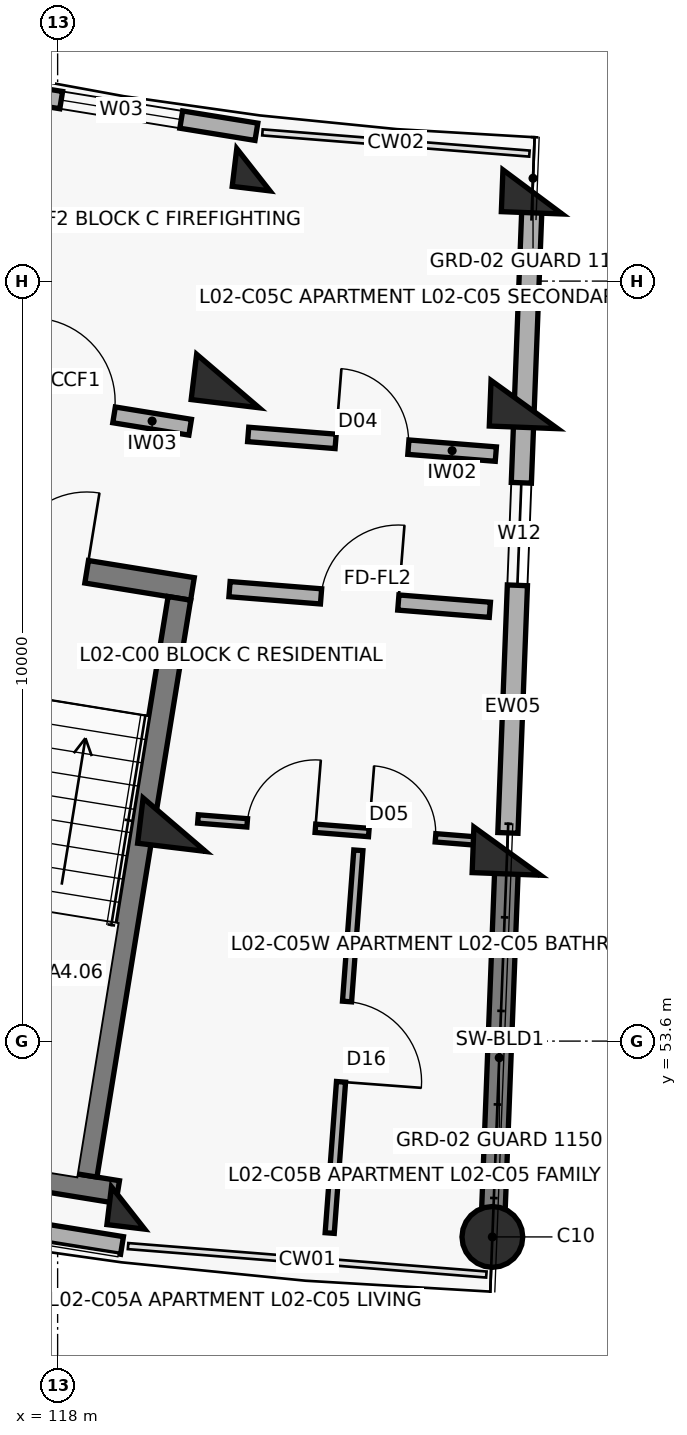
"""IFC4 building model, lengths in metres.
Left out: names, types, materials, properties, quantities, classifications, styles, units other than length and angle.
Written with IfcOpenShell. Run it as: python <this file> out.ifc"""

import sys

from ifc_helpers import new_model, si_unit, direction, frame, frame_2d, origin, origin_2d, place, context, subcontext, project, spatial, rectangle, circle, extrude, element, fill, save


model = new_model("IFC4")
c1 = context("Model", 3, precision=1e-05, world=origin(), true_north=direction((0.0, 1.0)))
c2 = subcontext(c1, "Body", "Model", "MODEL_VIEW")
j1 = project(units=[si_unit("LENGTHUNIT", "METRE"), si_unit("PLANEANGLEUNIT", "RADIAN")], contexts=[c1])
p1 = place(None, origin())
s1 = spatial("IfcSite", under=j1, at=p1, CompositionType="ELEMENT")
p2 = place(p1, origin())
s2 = spatial("IfcBuilding", under=s1, at=p2, CompositionType="ELEMENT")
p3 = place(p2, frame((0.0, 0.0, 8.1)))
s3 = spatial("IfcBuildingStorey", under=s2, at=p3, CompositionType="ELEMENT", Elevation=8.1)
p4 = place(p3, frame((120.575, 65.065, 0.0), z_axis=(0.0, 0.0, 1.0), x_axis=(-0.119790293837, -0.992799217114, 0.0)))
e1 = element("IfcColumn", 1, at=p4, inside=s3, PredefinedType="COLUMN", context=c2, shape_type="SweptSolid", body=[
    extrude(rectangle(XDim=0.5, YDim=0.5, at=origin_2d()), origin(), (0.0, 0.0, 1.0), 3.1),
])
for number, where, z_axis, x_axis in (
    (2, (120.24, 62.285, 0.0), (0.0, 0.0, 1.0), (-0.12, -0.993, 0.0)),
    (3, (119.535, 56.448, 0.0), (0.0, 0.0, 1.0), (-0.12, -0.993, 0.0)),
):
    element("IfcColumn", number, at=place(p3, frame(where, z_axis=z_axis, x_axis=x_axis)), inside=s3, PredefinedType="COLUMN", context=c2, shape_type="SweptSolid", body=[
        extrude(rectangle(XDim=0.6, YDim=0.9, at=origin_2d()), origin(), (0.0, 0.0, 1.0), 3.1),
    ])
p5 = place(p3, frame((118.927, 51.404, 0.0), z_axis=(0.0, 0.0, 1.0), x_axis=(-0.119790293837, -0.992799217114, 0.0)))
e4 = element("IfcColumn", 4, at=p5, inside=s3, PredefinedType="COLUMN", context=c2, shape_type="SweptSolid", body=[
    extrude(rectangle(XDim=0.5, YDim=0.5, at=origin_2d()), origin(), (0.0, 0.0, 1.0), 3.1),
])
p6 = place(p3, frame((124.248, 64.773, 0.0), z_axis=(0.0, 0.0, 1.0), x_axis=(-0.038387809088, -0.999262916411, 0.0)))
e5 = element("IfcColumn", 5, at=p6, inside=s3, PredefinedType="COLUMN", context=c2, shape_type="SweptSolid", body=[
    extrude(rectangle(XDim=0.55, YDim=0.8, at=origin_2d()), origin(), (0.0, 0.0, 1.0), 3.1),
])
for number, where, z_axis, x_axis in (
    (6, (124.14, 61.975, 0.0), (0.0, 0.0, 1.0), (-0.038, -0.999, 0.0)),
    (7, (123.915, 56.1, 0.0), (0.0, 0.0, 1.0), (-0.038, -0.999, 0.0)),
):
    element("IfcColumn", number, at=place(p3, frame(where, z_axis=z_axis, x_axis=x_axis)), inside=s3, PredefinedType="COLUMN", context=c2, shape_type="SweptSolid", body=[
        extrude(rectangle(XDim=0.6, YDim=0.9, at=origin_2d()), origin(), (0.0, 0.0, 1.0), 3.1),
    ])
p7 = place(p3, frame((123.72, 51.023, 0.0), z_axis=(0.0, 0.0, 1.0), x_axis=(-0.038387809088, -0.999262916411, 0.0)))
e8 = element("IfcColumn", 8, at=p7, inside=s3, PredefinedType="COLUMN", context=c2, shape_type="SweptSolid", body=[
    extrude(circle(Radius=0.4, at=origin_2d()), origin(), (0.0, 0.0, 1.0), 3.1),
])
p8 = place(p3, frame((123.908, 55.92, 0.0), z_axis=(0.0, 0.0, 1.0), x_axis=(-0.038381471406, -0.99926315986, 0.0)))
e9 = element("IfcWall", 9, at=p8, inside=s3, PredefinedType="SHEAR", context=c2, shape_type="SweptSolid", body=[
    extrude(rectangle(XDim=4.72, YDim=0.31, at=frame_2d((2.36, 0.0))), origin(), (0.0, 0.0, 1.0), 2.86),
])
p9 = place(p3, frame((114.1, 51.681, 0.0), z_axis=(0.0, 0.0, 1.0), x_axis=(0.987080750493, -0.160223568819, 0.0)))
e10 = element("IfcWall", 10, at=p9, inside=s3, PredefinedType="SOLIDWALL", context=c2, shape_type="SweptSolid", body=[
    extrude(rectangle(XDim=4.809, YDim=0.235, at=frame_2d((2.404, 0.0))), origin(), (0.0, 0.0, 1.0), 2.25),
])
p10 = place(p3, frame((117.058, 66.142, 0.0), z_axis=(0.0, 0.0, 1.0), x_axis=(0.987080874485, -0.160222804952, 0.0)))
e11 = element("IfcWall", 11, at=p10, inside=s3, PredefinedType="SOLIDWALL", context=c2, shape_type="SweptSolid", body=[
    extrude(rectangle(XDim=3.604, YDim=0.23, at=frame_2d((1.802, 0.0))), origin(), (0.0, 0.0, 1.0), 2.25),
])
p11 = place(p10, frame((1.002, 0.0, 0.32)))
e12 = element("IfcOpeningElement", 12, at=p11, cuts=e11, PredefinedType="OPENING", context=c2, shape_type="SweptSolid", body=[
    extrude(rectangle(XDim=1.6, YDim=1.5, at=frame_2d((0.8, 0.75))), frame((0.0, 0.125, 0.0), z_axis=(0.0, -1.0, 0.0), x_axis=(1.0, 0.0, 0.0)), (0.0, 0.0, 1.0), 0.25),
])
p12 = place(p3, frame((124.239, 64.533, 0.0), z_axis=(0.0, 0.0, 1.0), x_axis=(-0.038407966241, -0.999262141847, 0.0)))
e13 = element("IfcWall", 13, at=p12, inside=s3, PredefinedType="SOLIDWALL", context=c2, shape_type="SweptSolid", body=[
    extrude(rectangle(XDim=8.2, YDim=0.265, at=frame_2d((4.1, 0.0))), origin(), (0.0, 0.0, 1.0), 2.08),
])
p13 = place(p12, frame((3.59, 0.0, 0.75)))
e14 = element("IfcOpeningElement", 14, at=p13, cuts=e13, PredefinedType="OPENING", context=c2, shape_type="SweptSolid", body=[
    extrude(rectangle(XDim=1.35, YDim=1.35, at=frame_2d((0.675, 0.675))), frame((0.0, 0.142, 0.0), z_axis=(0.0, -1.0, 0.0), x_axis=(1.0, 0.0, 0.0)), (0.0, 0.0, 1.0), 0.285),
])
p14 = place(p3, frame((115.954, 60.169, 0.0), z_axis=(0.0, 0.0, 1.0), x_axis=(0.987077443397, -0.160243941341, 0.0)))
e15 = element("IfcWall", 15, at=p14, inside=s3, PredefinedType="SHEAR", context=c2, shape_type="SweptSolid", body=[
    extrude(rectangle(XDim=3.87, YDim=0.3, at=frame_2d((1.935, 0.0))), origin(), (0.0, 0.0, 1.0), 3.1),
])
p15 = place(p14, frame((1.41, 0.0, 0.0)))
e16 = element("IfcOpeningElement", 16, at=p15, cuts=e15, PredefinedType="OPENING", context=c2, shape_type="SweptSolid", body=[
    extrude(rectangle(XDim=1.05, YDim=2.15, at=frame_2d((0.525, 1.075))), frame((0.0, 0.16, 0.0), z_axis=(0.0, -1.0, 0.0), x_axis=(1.0, 0.0, 0.0)), (0.0, 0.0, 1.0), 0.32),
])
p16 = place(p3, frame((114.377, 52.331, 0.0), z_axis=(0.0, 0.0, 1.0), x_axis=(0.987077474317, -0.16024375088, 0.0)))
e17 = element("IfcWall", 17, at=p16, inside=s3, PredefinedType="SHEAR", context=c2, shape_type="SweptSolid", body=[
    extrude(rectangle(XDim=4.47, YDim=0.3, at=frame_2d((2.235, 0.0))), origin(), (0.0, 0.0, 1.0), 3.1),
])
p17 = place(p3, frame((119.602, 59.425, 0.0), z_axis=(0.0, 0.0, 1.0), x_axis=(-0.160201584773, -0.987084318706, 0.0)))
e18 = element("IfcWall", 18, at=p17, inside=s3, PredefinedType="SHEAR", context=c2, shape_type="SweptSolid", body=[
    extrude(rectangle(XDim=7.69, YDim=0.3, at=frame_2d((3.845, 0.0))), origin(), (0.0, 0.0, 1.0), 3.1),
])
p18 = place(p3, frame((116.656, 62.178, 0.0), z_axis=(0.0, 0.0, 1.0), x_axis=(0.987083140276, -0.16020884552, 0.0)))
e19 = element("IfcWall", 19, at=p18, inside=s3, PredefinedType="SOLIDWALL", context=c2, shape_type="SweptSolid", body=[
    extrude(rectangle(XDim=3.129, YDim=0.21, at=frame_2d((1.564, 0.0))), origin(), (0.0, 0.0, 1.0), 2.08),
])
p19 = place(p18, frame((1.014, 0.0, 0.0)))
e20 = element("IfcOpeningElement", 20, at=p19, cuts=e19, PredefinedType="OPENING", context=c2, shape_type="SweptSolid", body=[
    extrude(rectangle(XDim=1.1, YDim=2.15, at=frame_2d((0.55, 1.075))), frame((0.0, 0.115, 0.0), z_axis=(0.0, -1.0, 0.0), x_axis=(1.0, 0.0, 0.0)), (0.0, 0.0, 1.0), 0.23),
])
p20 = place(p3, frame((120.261, 59.547, 0.0), z_axis=(0.0, 0.0, 1.0), x_axis=(0.996862545573, -0.079152165058, 0.0)))
e21 = element("IfcWall", 21, at=p20, inside=s3, PredefinedType="SOLIDWALL", context=c2, shape_type="SweptSolid", body=[
    extrude(rectangle(XDim=3.436, YDim=0.2, at=frame_2d((1.718, 0.0))), origin(), (0.0, 0.0, 1.0), 2.08),
])
p21 = place(p20, frame((1.208, 0.0, 0.0)))
e22 = element("IfcOpeningElement", 22, at=p21, cuts=e21, PredefinedType="OPENING", context=c2, shape_type="SweptSolid", body=[
    extrude(rectangle(XDim=1.02, YDim=2.15, at=frame_2d((0.51, 1.075))), frame((0.0, 0.11, 0.0), z_axis=(0.0, -1.0, 0.0), x_axis=(1.0, 0.0, 0.0)), (0.0, 0.0, 1.0), 0.22),
])
p22 = place(p3, frame((120.507, 61.582, 0.0), z_axis=(0.0, 0.0, 1.0), x_axis=(0.996860715473, -0.07917521043, 0.0)))
e23 = element("IfcWall", 23, at=p22, inside=s3, PredefinedType="SOLIDWALL", context=c2, shape_type="SweptSolid", body=[
    extrude(rectangle(XDim=3.269, YDim=0.19, at=frame_2d((1.634, 0.0))), origin(), (0.0, 0.0, 1.0), 2.08),
])
p23 = place(p22, frame((1.154, 0.0, 0.0)))
e24 = element("IfcOpeningElement", 24, at=p23, cuts=e23, PredefinedType="OPENING", context=c2, shape_type="SweptSolid", body=[
    extrude(rectangle(XDim=0.96, YDim=2.1, at=frame_2d((0.48, 1.05))), frame((0.0, 0.105, 0.0), z_axis=(0.0, -1.0, 0.0), x_axis=(1.0, 0.0, 0.0)), (0.0, 0.0, 1.0), 0.21),
])
p24 = place(p3, frame((119.846, 56.523, 0.0), z_axis=(0.0, 0.0, 1.0), x_axis=(0.996863292793, -0.079142753818, 0.0)))
e25 = element("IfcWall", 25, at=p24, inside=s3, PredefinedType="PARTITIONING", context=c2, shape_type="SweptSolid", body=[
    extrude(rectangle(XDim=3.785, YDim=0.11, at=frame_2d((1.893, 0.0))), origin(), (0.0, 0.0, 1.0), 2.08),
])
p25 = place(p24, frame((0.65, 0.0, 0.0)))
e26 = element("IfcOpeningElement", 26, at=p25, cuts=e25, PredefinedType="OPENING", context=c2, shape_type="SweptSolid", body=[
    extrude(rectangle(XDim=0.9, YDim=2.1, at=frame_2d((0.45, 1.05))), frame((0.0, 0.065, 0.0), z_axis=(0.0, -1.0, 0.0), x_axis=(1.0, 0.0, 0.0)), (0.0, 0.0, 1.0), 0.13),
])
p26 = place(p24, frame((2.255, 0.0, 0.0)))
e27 = element("IfcOpeningElement", 27, at=p26, cuts=e25, PredefinedType="OPENING", context=c2, shape_type="SweptSolid", body=[
    extrude(rectangle(XDim=0.88, YDim=2.1, at=frame_2d((0.44, 1.05))), frame((0.0, 0.065, 0.0), z_axis=(0.0, -1.0, 0.0), x_axis=(1.0, 0.0, 0.0)), (0.0, 0.0, 1.0), 0.13),
])
p27 = place(p3, frame((121.957, 56.11, 0.0), z_axis=(0.0, 0.0, 1.0), x_axis=(-0.074644522148, -0.997210206182, 0.0)))
e28 = element("IfcWall", 28, at=p27, inside=s3, PredefinedType="PARTITIONING", context=c2, shape_type="SweptSolid", body=[
    extrude(rectangle(XDim=5.05, YDim=0.12, at=frame_2d((2.525, 0.0))), origin(), (0.0, 0.0, 1.0), 2.08),
])
p28 = place(p27, frame((1.995, 0.0, 0.0)))
e29 = element("IfcOpeningElement", 29, at=p28, cuts=e28, PredefinedType="OPENING", context=c2, shape_type="SweptSolid", body=[
    extrude(rectangle(XDim=1.06, YDim=2.1, at=frame_2d((0.53, 1.05))), frame((0.0, 0.07, 0.0), z_axis=(0.0, -1.0, 0.0), x_axis=(1.0, 0.0, 0.0)), (0.0, 0.0, 1.0), 0.14),
])
p29 = place(p11, origin())
e30 = element("IfcWindow", 30, at=p29, inside=s3, PartitioningType="DOUBLE_PANEL_VERTICAL", PredefinedType="WINDOW", context=c2, shape_type="SweptSolid", body=[
    extrude(rectangle(XDim=1.6, YDim=1.5, at=frame_2d((0.8, 0.75))), frame((0.0, 0.03, 0.0), z_axis=(0.0, -1.0, 0.0), x_axis=(1.0, 0.0, 0.0)), (0.0, 0.0, 1.0), 0.06),
])
fill(e12, e30)
p30 = place(p13, origin())
e31 = element("IfcWindow", 31, at=p30, inside=s3, PartitioningType="DOUBLE_PANEL_VERTICAL", PredefinedType="WINDOW", context=c2, shape_type="SweptSolid", body=[
    extrude(rectangle(XDim=1.35, YDim=1.35, at=frame_2d((0.675, 0.675))), frame((0.0, 0.03, 0.0), z_axis=(0.0, -1.0, 0.0), x_axis=(1.0, 0.0, 0.0)), (0.0, 0.0, 1.0), 0.06),
])
fill(e14, e31)
p31 = place(p15, origin())
e32 = element("IfcDoor", 32, at=p31, inside=s3, OperationType="SINGLE_SWING_RIGHT", PredefinedType="DOOR", context=c2, shape_type="SweptSolid", body=[
    extrude(rectangle(XDim=1.05, YDim=2.15, at=frame_2d((0.525, 1.075))), frame((0.0, 0.025, 0.0), z_axis=(0.0, -1.0, 0.0), x_axis=(1.0, 0.0, 0.0)), (0.0, 0.0, 1.0), 0.05),
])
fill(e16, e32)
p32 = place(p19, origin())
e33 = element("IfcDoor", 33, at=p32, inside=s3, OperationType="SINGLE_SWING_LEFT", PredefinedType="DOOR", context=c2, shape_type="SweptSolid", body=[
    extrude(rectangle(XDim=1.1, YDim=2.15, at=frame_2d((0.55, 1.075))), frame((0.0, 0.025, 0.0), z_axis=(0.0, -1.0, 0.0), x_axis=(1.0, 0.0, 0.0)), (0.0, 0.0, 1.0), 0.05),
])
fill(e20, e33)
p33 = place(p21, origin())
e34 = element("IfcDoor", 34, at=p33, inside=s3, OperationType="SINGLE_SWING_RIGHT", PredefinedType="DOOR", context=c2, shape_type="SweptSolid", body=[
    extrude(rectangle(XDim=1.02, YDim=2.15, at=frame_2d((0.51, 1.075))), frame((0.0, 0.025, 0.0), z_axis=(0.0, -1.0, 0.0), x_axis=(1.0, 0.0, 0.0)), (0.0, 0.0, 1.0), 0.05),
])
fill(e22, e34)
p34 = place(p23, origin())
e35 = element("IfcDoor", 35, at=p34, inside=s3, OperationType="SINGLE_SWING_LEFT", PredefinedType="DOOR", context=c2, shape_type="SweptSolid", body=[
    extrude(rectangle(XDim=0.96, YDim=2.1, at=frame_2d((0.48, 1.05))), frame((0.0, 0.025, 0.0), z_axis=(0.0, -1.0, 0.0), x_axis=(1.0, 0.0, 0.0)), (0.0, 0.0, 1.0), 0.05),
])
fill(e24, e35)
p35 = place(p25, origin())
e36 = element("IfcDoor", 36, at=p35, inside=s3, OperationType="SINGLE_SWING_RIGHT", PredefinedType="DOOR", context=c2, shape_type="SweptSolid", body=[
    extrude(rectangle(XDim=0.9, YDim=2.1, at=frame_2d((0.45, 1.05))), frame((0.0, 0.025, 0.0), z_axis=(0.0, -1.0, 0.0), x_axis=(1.0, 0.0, 0.0)), (0.0, 0.0, 1.0), 0.05),
])
fill(e26, e36)
p36 = place(p26, origin())
e37 = element("IfcDoor", 37, at=p36, inside=s3, OperationType="SINGLE_SWING_LEFT", PredefinedType="DOOR", context=c2, shape_type="SweptSolid", body=[
    extrude(rectangle(XDim=0.88, YDim=2.1, at=frame_2d((0.44, 1.05))), frame((0.0, 0.025, 0.0), z_axis=(0.0, -1.0, 0.0), x_axis=(1.0, 0.0, 0.0)), (0.0, 0.0, 1.0), 0.05),
])
fill(e27, e37)
p37 = place(p28, origin())
e38 = element("IfcDoor", 38, at=p37, inside=s3, OperationType="SINGLE_SWING_RIGHT", PredefinedType="DOOR", context=c2, shape_type="SweptSolid", body=[
    extrude(rectangle(XDim=1.06, YDim=2.1, at=frame_2d((0.53, 1.05))), frame((0.0, 0.025, 0.0), z_axis=(0.0, -1.0, 0.0), x_axis=(1.0, 0.0, 0.0)), (0.0, 0.0, 1.0), 0.05),
])
fill(e29, e38)
save(model, sys.argv[1])
